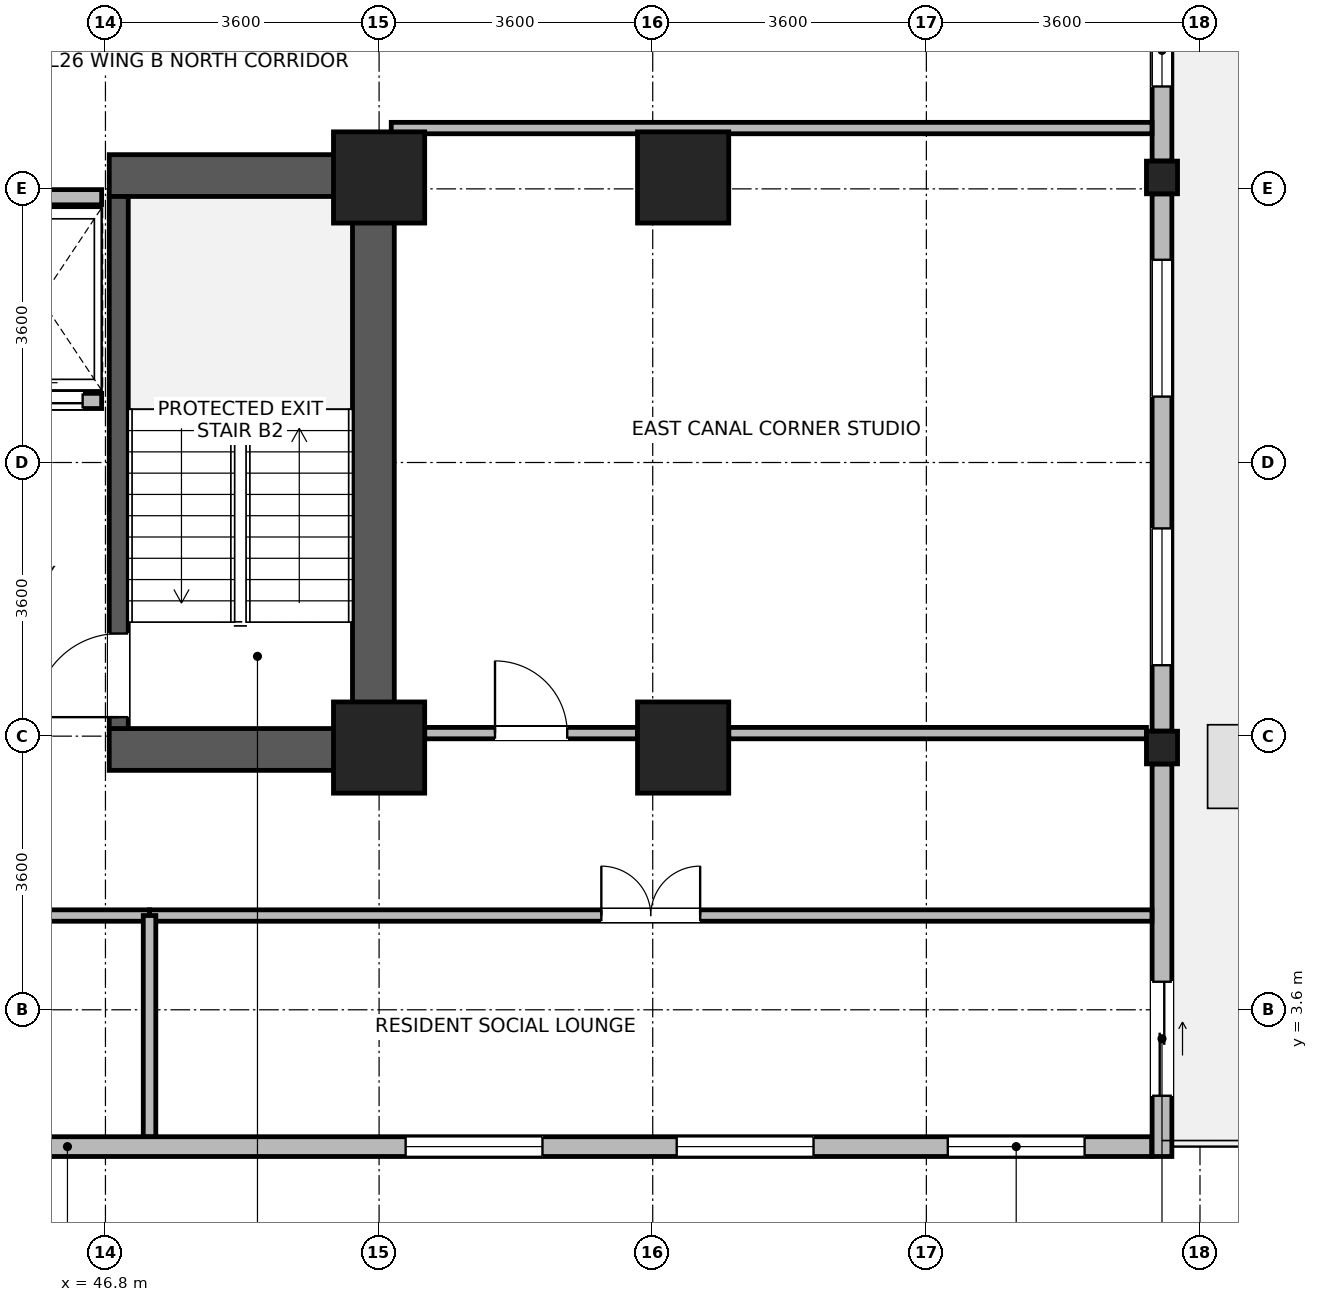
"""IFC4 building model, lengths in metres.
Left out: names, types, materials, properties, quantities, classifications, styles, units other than length and angle.
Written with IfcOpenShell. Run it as: python <this file> out.ifc"""

import sys

from ifc_helpers import new_model, si_unit, direction, frame, frame_2d, origin, origin_2d, place, context, subcontext, project, spatial, rectangle, i_section, extrude, source, transform, mapped, element, fill, save


model = new_model("IFC4")
c1 = context("Model", 3, precision=1e-05, world=origin(), true_north=direction((0.0, 1.0)))
c2 = subcontext(c1, "Body", "Model", "MODEL_VIEW")
j1 = project(units=[si_unit("LENGTHUNIT", "METRE"), si_unit("PLANEANGLEUNIT", "RADIAN")], contexts=[c1])
p1 = place(None, origin())
s1 = spatial("IfcSite", under=j1, at=p1, CompositionType="ELEMENT")
p2 = place(p1, origin())
s2 = spatial("IfcBuilding", under=s1, at=p2, CompositionType="ELEMENT")
p3 = place(p2, frame((0.0, 0.0, 104.5)))
s3 = spatial("IfcBuildingStorey", under=s2, at=p3, CompositionType="ELEMENT", Elevation=104.5)
p4 = place(p3, frame((50.325, 6.75, 0.0), z_axis=(0.0, 0.0, 1.0), x_axis=(0.0, 1.0, 0.0)))
e1 = element("IfcWall", 1, at=p4, inside=s3, PredefinedType="SHEAR", context=c2, shape_type="SweptSolid", body=[
    extrude(rectangle(XDim=8.1, YDim=0.55, at=frame_2d((4.05, 0.0))), origin(), (0.0, 0.0, 1.0), 3.45),
])
for number, where, z_axis, x_axis in (
    (2, (46.85, 7.025, 0.0), (0.0, 0.0, 1.0), (1.0, 0.0, 0.0)),
    (3, (46.85, 14.575, 0.0), (0.0, 0.0, 1.0), (1.0, 0.0, 0.0)),
):
    element("IfcWall", number, at=place(p3, frame(where, z_axis=z_axis, x_axis=x_axis)), inside=s3, PredefinedType="SHEAR", context=c2, shape_type="SweptSolid", body=[
        extrude(rectangle(XDim=3.2, YDim=0.55, at=frame_2d((1.6, 0.0))), origin(), (0.0, 0.0, 1.0), 3.45),
    ])
p5 = place(p3, frame((46.975, 7.3, 0.0), z_axis=(0.0, 0.0, 1.0), x_axis=(0.0, 1.0, 0.0)))
e4 = element("IfcWall", 4, at=p5, inside=s3, PredefinedType="SHEAR", context=c2, shape_type="SweptSolid", body=[
    extrude(rectangle(XDim=7.0, YDim=0.25, at=frame_2d((3.5, 0.0))), origin(), (0.0, 0.0, 1.0), 3.45),
])
p6 = place(p5, frame((0.15, 0.0, 0.0)))
e5 = element("IfcOpeningElement", 5, at=p6, cuts=e4, PredefinedType="OPENING", context=c2, shape_type="SweptSolid", body=[
    extrude(rectangle(XDim=1.1, YDim=2.08, at=frame_2d((0.55, 1.04))), frame((0.0, 0.135, 0.0), z_axis=(0.0, -1.0, 0.0), x_axis=(1.0, 0.0, 0.0)), (0.0, 0.0, 1.0), 0.27),
])
m1 = source(origin(), c2, "Body", "SweptSolid", [
    extrude(rectangle(XDim=1.2, YDim=1.2, at=origin_2d()), origin(), (0.0, 0.0, 1.0), 3.7),
])
for number, where, z_axis, x_axis in (
    (6, (50.4, 7.05, 0.0), (0.0, 0.0, 1.0), (1.0, 0.0, 0.0)),
    (7, (50.4, 14.55, 0.0), (0.0, 0.0, 1.0), (1.0, 0.0, 0.0)),
    (8, (54.4, 7.05, 0.0), (0.0, 0.0, 1.0), (1.0, 0.0, 0.0)),
    (9, (54.4, 14.55, 0.0), (0.0, 0.0, 1.0), (1.0, 0.0, 0.0)),
):
    element("IfcColumn", number, at=place(p3, frame(where, z_axis=z_axis, x_axis=x_axis)), inside=s3, PredefinedType="COLUMN", context=c2, shape_type="MappedRepresentation", body=[
        mapped(m1, transform((0.0, 0.0, 0.0), x_axis=(1.0, 0.0, 0.0), y_axis=(0.0, 1.0, 0.0), z_axis=(0.0, 0.0, 1.0), scale=1.0)),
    ])
m2 = source(origin(), c2, "Body", "SweptSolid", [
    extrude(i_section(OverallWidth=0.409, OverallDepth=0.43, WebThickness=0.024, FlangeThickness=0.033, FilletRadius=0.015, at=origin_2d()), origin(), (0.0, 0.0, 1.0), 3.7),
])
for number, where, z_axis, x_axis in (
    (10, (60.7, 7.05, 0.0), (0.0, 0.0, 1.0), (1.0, 0.0, 0.0)),
    (11, (60.7, 14.55, 0.0), (0.0, 0.0, 1.0), (1.0, 0.0, 0.0)),
):
    element("IfcColumn", number, at=place(p3, frame(where, z_axis=z_axis, x_axis=x_axis)), inside=s3, PredefinedType="COLUMN", context=c2, shape_type="MappedRepresentation", body=[
        mapped(m2, transform((0.0, 0.0, 0.0), x_axis=(1.0, 0.0, 0.0), y_axis=(0.0, 1.0, 0.0), z_axis=(0.0, 0.0, 1.0), scale=1.0)),
    ])
p7 = place(p3, frame((60.565, 1.8, 0.0), z_axis=(0.0, 0.0, 1.0), x_axis=(-1.0, 0.0, 0.0)))
e12 = element("IfcWall", 12, at=p7, inside=s3, PredefinedType="STANDARD", context=c2, shape_type="SweptSolid", body=[
    extrude(rectangle(XDim=28.53, YDim=0.26, at=frame_2d((14.265, 0.0))), origin(), (0.0, 0.0, 1.0), 3.43),
])
p8 = place(p7, frame((0.883, 0.0, 0.85)))
e13 = element("IfcOpeningElement", 13, at=p8, cuts=e12, PredefinedType="OPENING", context=c2, shape_type="SweptSolid", body=[
    extrude(rectangle(XDim=1.8, YDim=1.85, at=frame_2d((0.9, 0.925))), frame((0.0, 0.14, 0.0), z_axis=(0.0, -1.0, 0.0), x_axis=(1.0, 0.0, 0.0)), (0.0, 0.0, 1.0), 0.28),
])
p9 = place(p7, frame((4.449, 0.0, 0.85)))
e14 = element("IfcOpeningElement", 14, at=p9, cuts=e12, PredefinedType="OPENING", context=c2, shape_type="SweptSolid", body=[
    extrude(rectangle(XDim=1.8, YDim=1.85, at=frame_2d((0.9, 0.925))), frame((0.0, 0.14, 0.0), z_axis=(0.0, -1.0, 0.0), x_axis=(1.0, 0.0, 0.0)), (0.0, 0.0, 1.0), 0.28),
])
p10 = place(p7, frame((8.016, 0.0, 0.85)))
e15 = element("IfcOpeningElement", 15, at=p10, cuts=e12, PredefinedType="OPENING", context=c2, shape_type="SweptSolid", body=[
    extrude(rectangle(XDim=1.8, YDim=1.85, at=frame_2d((0.9, 0.925))), frame((0.0, 0.14, 0.0), z_axis=(0.0, -1.0, 0.0), x_axis=(1.0, 0.0, 0.0)), (0.0, 0.0, 1.0), 0.28),
])
p11 = place(p7, frame((15.148, 0.0, 0.85)))
e16 = element("IfcOpeningElement", 16, at=p11, cuts=e12, PredefinedType="OPENING", context=c2, shape_type="SweptSolid", body=[
    extrude(rectangle(XDim=1.8, YDim=1.85, at=frame_2d((0.9, 0.925))), frame((0.0, 0.14, 0.0), z_axis=(0.0, -1.0, 0.0), x_axis=(1.0, 0.0, 0.0)), (0.0, 0.0, 1.0), 0.28),
])
p12 = place(p7, frame((18.714, 0.0, 0.85)))
e17 = element("IfcOpeningElement", 17, at=p12, cuts=e12, PredefinedType="OPENING", context=c2, shape_type="SweptSolid", body=[
    extrude(rectangle(XDim=1.8, YDim=1.85, at=frame_2d((0.9, 0.925))), frame((0.0, 0.14, 0.0), z_axis=(0.0, -1.0, 0.0), x_axis=(1.0, 0.0, 0.0)), (0.0, 0.0, 1.0), 0.28),
])
p13 = place(p7, frame((22.281, 0.0, 0.85)))
e18 = element("IfcOpeningElement", 18, at=p13, cuts=e12, PredefinedType="OPENING", context=c2, shape_type="SweptSolid", body=[
    extrude(rectangle(XDim=1.8, YDim=1.85, at=frame_2d((0.9, 0.925))), frame((0.0, 0.14, 0.0), z_axis=(0.0, -1.0, 0.0), x_axis=(1.0, 0.0, 0.0)), (0.0, 0.0, 1.0), 0.28),
])
p14 = place(p7, frame((25.847, 0.0, 0.85)))
e19 = element("IfcOpeningElement", 19, at=p14, cuts=e12, PredefinedType="OPENING", context=c2, shape_type="SweptSolid", body=[
    extrude(rectangle(XDim=1.8, YDim=1.85, at=frame_2d((0.9, 0.925))), frame((0.0, 0.14, 0.0), z_axis=(0.0, -1.0, 0.0), x_axis=(1.0, 0.0, 0.0)), (0.0, 0.0, 1.0), 0.28),
])
p15 = place(p3, frame((60.7, 6.834, 0.0), z_axis=(0.0, 0.0, 1.0), x_axis=(0.0, -1.0, 0.0)))
e20 = element("IfcWall", 20, at=p15, inside=s3, PredefinedType="STANDARD", context=c2, shape_type="SweptSolid", body=[
    extrude(rectangle(XDim=5.164, YDim=0.26, at=frame_2d((2.582, 0.0))), origin(), (0.0, 0.0, 1.0), 3.43),
])
p16 = place(p15, frame((2.865, 0.0, 0.0)))
e21 = element("IfcOpeningElement", 21, at=p16, cuts=e20, PredefinedType="OPENING", context=c2, shape_type="SweptSolid", body=[
    extrude(rectangle(XDim=1.5, YDim=2.15, at=frame_2d((0.75, 1.075))), frame((0.0, 0.14, 0.0), z_axis=(0.0, -1.0, 0.0), x_axis=(1.0, 0.0, 0.0)), (0.0, 0.0, 1.0), 0.28),
])
p17 = place(p3, frame((60.7, 14.334, 0.0), z_axis=(0.0, 0.0, 1.0), x_axis=(0.0, -1.0, 0.0)))
e22 = element("IfcWall", 22, at=p17, inside=s3, PredefinedType="STANDARD", context=c2, shape_type="SweptSolid", body=[
    extrude(rectangle(XDim=7.068, YDim=0.26, at=frame_2d((3.534, 0.0))), origin(), (0.0, 0.0, 1.0), 2.98),
])
p18 = place(p17, frame((0.867, 0.0, 0.85)))
e23 = element("IfcOpeningElement", 23, at=p18, cuts=e22, PredefinedType="OPENING", context=c2, shape_type="SweptSolid", body=[
    extrude(rectangle(XDim=1.8, YDim=1.85, at=frame_2d((0.9, 0.925))), frame((0.0, 0.14, 0.0), z_axis=(0.0, -1.0, 0.0), x_axis=(1.0, 0.0, 0.0)), (0.0, 0.0, 1.0), 0.28),
])
p19 = place(p17, frame((4.401, 0.0, 0.85)))
e24 = element("IfcOpeningElement", 24, at=p19, cuts=e22, PredefinedType="OPENING", context=c2, shape_type="SweptSolid", body=[
    extrude(rectangle(XDim=1.8, YDim=1.85, at=frame_2d((0.9, 0.925))), frame((0.0, 0.14, 0.0), z_axis=(0.0, -1.0, 0.0), x_axis=(1.0, 0.0, 0.0)), (0.0, 0.0, 1.0), 0.28),
])
p20 = place(p3, frame((60.7, 21.384, 0.0), z_axis=(0.0, 0.0, 1.0), x_axis=(0.0, -1.0, 0.0)))
e25 = element("IfcWall", 25, at=p20, inside=s3, PredefinedType="STANDARD", context=c2, shape_type="SweptSolid", body=[
    extrude(rectangle(XDim=6.618, YDim=0.26, at=frame_2d((3.309, 0.0))), origin(), (0.0, 0.0, 1.0), 2.98),
])
p21 = place(p20, frame((0.754, 0.0, 0.85)))
e26 = element("IfcOpeningElement", 26, at=p21, cuts=e25, PredefinedType="OPENING", context=c2, shape_type="SweptSolid", body=[
    extrude(rectangle(XDim=1.8, YDim=1.85, at=frame_2d((0.9, 0.925))), frame((0.0, 0.14, 0.0), z_axis=(0.0, -1.0, 0.0), x_axis=(1.0, 0.0, 0.0)), (0.0, 0.0, 1.0), 0.28),
])
p22 = place(p20, frame((4.687, 0.0, 0.85)))
e27 = element("IfcOpeningElement", 27, at=p22, cuts=e25, PredefinedType="OPENING", context=c2, shape_type="SweptSolid", body=[
    extrude(rectangle(XDim=0.95, YDim=1.75, at=frame_2d((0.475, 0.875))), frame((0.0, 0.14, 0.0), z_axis=(0.0, -1.0, 0.0), x_axis=(1.0, 0.0, 0.0)), (0.0, 0.0, 1.0), 0.28),
])
p23 = place(p3, frame((45.15, 11.61, 0.0), z_axis=(0.0, 0.0, 1.0), x_axis=(1.0, 0.0, 0.0)))
e28 = element("IfcWall", 28, at=p23, inside=s3, PredefinedType="PARTITIONING", context=c2, shape_type="SweptSolid", body=[
    extrude(rectangle(XDim=1.6, YDim=0.2, at=frame_2d((0.8, 0.0))), origin(), (0.0, 0.0, 1.0), 3.43),
])
p24 = place(p23, frame((0.25, 0.0, 0.0)))
e29 = element("IfcOpeningElement", 29, at=p24, cuts=e28, PredefinedType="OPENING", context=c2, shape_type="SweptSolid", body=[
    extrude(rectangle(XDim=1.1, YDim=2.12, at=frame_2d((0.55, 1.06))), frame((0.0, 0.11, 0.0), z_axis=(0.0, -1.0, 0.0), x_axis=(1.0, 0.0, 0.0)), (0.0, 0.0, 1.0), 0.22),
])
p25 = place(p3, frame((45.15, 14.29, 0.0), z_axis=(0.0, 0.0, 1.0), x_axis=(1.0, 0.0, 0.0)))
e30 = element("IfcWall", 30, at=p25, inside=s3, PredefinedType="PARTITIONING", context=c2, shape_type="SweptSolid", body=[
    extrude(rectangle(XDim=1.6, YDim=0.2, at=frame_2d((0.8, 0.0))), origin(), (0.0, 0.0, 1.0), 2.43),
])
p26 = place(p3, frame((47.38, 4.84, 0.0), z_axis=(0.0, 0.0, 1.0), x_axis=(1.0, 0.0, 0.0)))
e31 = element("IfcWall", 31, at=p26, inside=s3, PredefinedType="PARTITIONING", context=c2, shape_type="SweptSolid", body=[
    extrude(rectangle(XDim=13.188, YDim=0.15, at=frame_2d((6.594, 0.0))), origin(), (0.0, 0.0, 1.0), 3.43),
])
p27 = place(p26, frame((5.944, 0.0, 0.0)))
e32 = element("IfcOpeningElement", 32, at=p27, cuts=e31, PredefinedType="OPENING", context=c2, shape_type="SweptSolid", body=[
    extrude(rectangle(XDim=1.3, YDim=2.12, at=frame_2d((0.65, 1.06))), frame((0.0, 0.085, 0.0), z_axis=(0.0, -1.0, 0.0), x_axis=(1.0, 0.0, 0.0)), (0.0, 0.0, 1.0), 0.17),
])
p28 = place(p3, frame((51.0, 7.24, 0.0), z_axis=(0.0, 0.0, 1.0), x_axis=(1.0, 0.0, 0.0)))
e33 = element("IfcWall", 33, at=p28, inside=s3, PredefinedType="PARTITIONING", context=c2, shape_type="SweptSolid", body=[
    extrude(rectangle(XDim=2.8, YDim=0.15, at=frame_2d((1.4, 0.0))), origin(), (0.0, 0.0, 1.0), 2.78),
])
p29 = place(p28, frame((0.925, 0.0, 0.0)))
e34 = element("IfcOpeningElement", 34, at=p29, cuts=e33, PredefinedType="OPENING", context=c2, shape_type="SweptSolid", body=[
    extrude(rectangle(XDim=0.95, YDim=2.1, at=frame_2d((0.475, 1.05))), frame((0.0, 0.085, 0.0), z_axis=(0.0, -1.0, 0.0), x_axis=(1.0, 0.0, 0.0)), (0.0, 0.0, 1.0), 0.17),
])
p30 = place(p3, frame((55.0, 7.24, 0.0), z_axis=(0.0, 0.0, 1.0), x_axis=(1.0, 0.0, 0.0)))
e35 = element("IfcWall", 35, at=p30, inside=s3, PredefinedType="PARTITIONING", context=c2, shape_type="SweptSolid", body=[
    extrude(rectangle(XDim=5.496, YDim=0.15, at=frame_2d((2.748, 0.0))), origin(), (0.0, 0.0, 1.0), 2.78),
])
p31 = place(p3, frame((50.56, 15.2, 0.0), z_axis=(0.0, 0.0, 1.0), x_axis=(1.0, 0.0, 0.0)))
e36 = element("IfcWall", 36, at=p31, inside=s3, PredefinedType="PARTITIONING", context=c2, shape_type="SweptSolid", body=[
    extrude(rectangle(XDim=10.008, YDim=0.15, at=frame_2d((5.004, 0.0))), origin(), (0.0, 0.0, 1.0), 3.43),
])
p32 = place(p3, frame((39.44, 4.84, 0.0), z_axis=(0.0, 0.0, 1.0), x_axis=(1.0, 0.0, 0.0)))
e37 = element("IfcWall", 37, at=p32, inside=s3, PredefinedType="PARTITIONING", context=c2, shape_type="SweptSolid", body=[
    extrude(rectangle(XDim=7.94, YDim=0.15, at=frame_2d((3.97, 0.0))), origin(), (0.0, 0.0, 1.0), 3.43),
])
p33 = place(p32, frame((3.495, 0.0, 0.0)))
e38 = element("IfcOpeningElement", 38, at=p33, cuts=e37, PredefinedType="OPENING", context=c2, shape_type="SweptSolid", body=[
    extrude(rectangle(XDim=0.95, YDim=2.1, at=frame_2d((0.475, 1.05))), frame((0.0, 0.085, 0.0), z_axis=(0.0, -1.0, 0.0), x_axis=(1.0, 0.0, 0.0)), (0.0, 0.0, 1.0), 0.17),
])
p34 = place(p3, frame((47.38, 1.932, 0.0), z_axis=(0.0, 0.0, 1.0), x_axis=(0.0, 1.0, 0.0)))
e39 = element("IfcWall", 39, at=p34, inside=s3, PredefinedType="PARTITIONING", context=c2, shape_type="SweptSolid", body=[
    extrude(rectangle(XDim=2.908, YDim=0.165, at=frame_2d((1.454, 0.0))), origin(), (0.0, 0.0, 1.0), 3.43),
])
p35 = place(p8, origin())
e40 = element("IfcWindow", 40, at=p35, inside=s3, PartitioningType="SINGLE_PANEL", PredefinedType="WINDOW", context=c2, shape_type="SweptSolid", body=[
    extrude(rectangle(XDim=1.8, YDim=1.85, at=frame_2d((0.9, 0.925))), frame((0.0, 0.03, 0.0), z_axis=(0.0, -1.0, 0.0), x_axis=(1.0, 0.0, 0.0)), (0.0, 0.0, 1.0), 0.06),
])
fill(e13, e40)
p36 = place(p9, origin())
e41 = element("IfcWindow", 41, at=p36, inside=s3, PartitioningType="SINGLE_PANEL", PredefinedType="WINDOW", context=c2, shape_type="SweptSolid", body=[
    extrude(rectangle(XDim=1.8, YDim=1.85, at=frame_2d((0.9, 0.925))), frame((0.0, 0.03, 0.0), z_axis=(0.0, -1.0, 0.0), x_axis=(1.0, 0.0, 0.0)), (0.0, 0.0, 1.0), 0.06),
])
fill(e14, e41)
p37 = place(p10, origin())
e42 = element("IfcWindow", 42, at=p37, inside=s3, PartitioningType="SINGLE_PANEL", PredefinedType="WINDOW", context=c2, shape_type="SweptSolid", body=[
    extrude(rectangle(XDim=1.8, YDim=1.85, at=frame_2d((0.9, 0.925))), frame((0.0, 0.03, 0.0), z_axis=(0.0, -1.0, 0.0), x_axis=(1.0, 0.0, 0.0)), (0.0, 0.0, 1.0), 0.06),
])
fill(e15, e42)
p38 = place(p16, origin())
e43 = element("IfcDoor", 43, at=p38, inside=s3, OperationType="SLIDING_TO_LEFT", PredefinedType="DOOR", context=c2, shape_type="SweptSolid", body=[
    extrude(rectangle(XDim=1.5, YDim=2.15, at=frame_2d((0.75, 1.075))), frame((0.0, 0.025, 0.0), z_axis=(0.0, -1.0, 0.0), x_axis=(1.0, 0.0, 0.0)), (0.0, 0.0, 1.0), 0.05),
])
fill(e21, e43)
p39 = place(p18, origin())
e44 = element("IfcWindow", 44, at=p39, inside=s3, PartitioningType="SINGLE_PANEL", PredefinedType="WINDOW", context=c2, shape_type="SweptSolid", body=[
    extrude(rectangle(XDim=1.8, YDim=1.85, at=frame_2d((0.9, 0.925))), frame((0.0, 0.03, 0.0), z_axis=(0.0, -1.0, 0.0), x_axis=(1.0, 0.0, 0.0)), (0.0, 0.0, 1.0), 0.06),
])
fill(e23, e44)
p40 = place(p19, origin())
e45 = element("IfcWindow", 45, at=p40, inside=s3, PartitioningType="SINGLE_PANEL", PredefinedType="WINDOW", context=c2, shape_type="SweptSolid", body=[
    extrude(rectangle(XDim=1.8, YDim=1.85, at=frame_2d((0.9, 0.925))), frame((0.0, 0.03, 0.0), z_axis=(0.0, -1.0, 0.0), x_axis=(1.0, 0.0, 0.0)), (0.0, 0.0, 1.0), 0.06),
])
fill(e24, e45)
p41 = place(p22, origin())
e46 = element("IfcWindow", 46, at=p41, inside=s3, PartitioningType="SINGLE_PANEL", PredefinedType="WINDOW", context=c2, shape_type="SweptSolid", body=[
    extrude(rectangle(XDim=0.95, YDim=1.75, at=frame_2d((0.475, 0.875))), frame((0.0, 0.03, 0.0), z_axis=(0.0, -1.0, 0.0), x_axis=(1.0, 0.0, 0.0)), (0.0, 0.0, 1.0), 0.06),
])
fill(e27, e46)
p42 = place(p6, origin())
e47 = element("IfcDoor", 47, at=p42, inside=s3, OperationType="SINGLE_SWING_LEFT", PredefinedType="DOOR", context=c2, shape_type="SweptSolid", body=[
    extrude(rectangle(XDim=1.1, YDim=2.08, at=frame_2d((0.55, 1.04))), frame((0.0, 0.025, 0.0), z_axis=(0.0, -1.0, 0.0), x_axis=(1.0, 0.0, 0.0)), (0.0, 0.0, 1.0), 0.05),
])
fill(e5, e47)
p43 = place(p24, origin())
e48 = element("IfcDoor", 48, at=p43, inside=s3, OperationType="SLIDING_TO_LEFT", PredefinedType="DOOR", context=c2, shape_type="SweptSolid", body=[
    extrude(rectangle(XDim=1.1, YDim=2.12, at=frame_2d((0.55, 1.06))), frame((0.0, 0.025, 0.0), z_axis=(0.0, -1.0, 0.0), x_axis=(1.0, 0.0, 0.0)), (0.0, 0.0, 1.0), 0.05),
])
fill(e29, e48)
p44 = place(p27, origin())
e49 = element("IfcDoor", 49, at=p44, inside=s3, OperationType="DOUBLE_DOOR_SINGLE_SWING", PredefinedType="DOOR", context=c2, shape_type="SweptSolid", body=[
    extrude(rectangle(XDim=1.3, YDim=2.12, at=frame_2d((0.65, 1.06))), frame((0.0, 0.025, 0.0), z_axis=(0.0, -1.0, 0.0), x_axis=(1.0, 0.0, 0.0)), (0.0, 0.0, 1.0), 0.05),
])
fill(e32, e49)
p45 = place(p29, origin())
e50 = element("IfcDoor", 50, at=p45, inside=s3, OperationType="SINGLE_SWING_LEFT", PredefinedType="DOOR", context=c2, shape_type="SweptSolid", body=[
    extrude(rectangle(XDim=0.95, YDim=2.1, at=frame_2d((0.475, 1.05))), frame((0.0, 0.025, 0.0), z_axis=(0.0, -1.0, 0.0), x_axis=(1.0, 0.0, 0.0)), (0.0, 0.0, 1.0), 0.05),
])
fill(e34, e50)
save(model, sys.argv[1])
